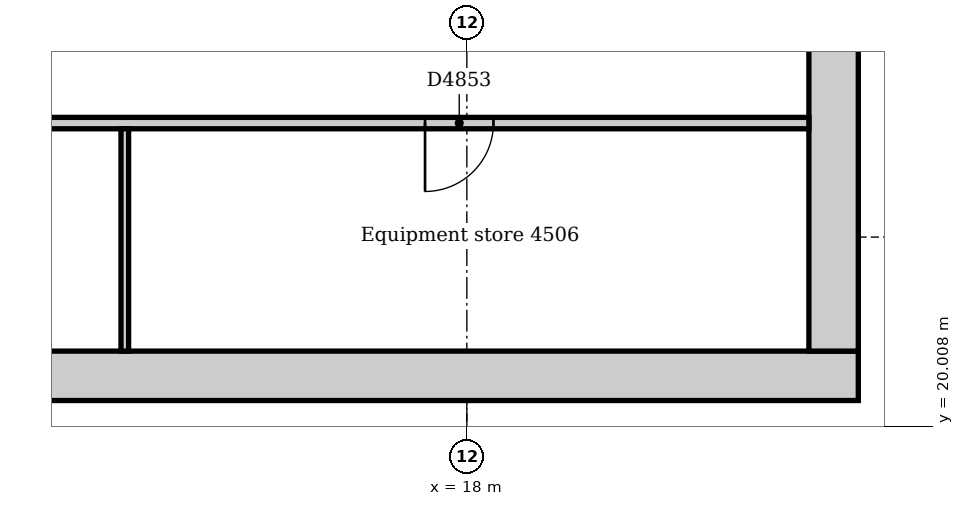
"""IFC4 building model, lengths in metres.
Left out: names, types, materials, properties, quantities, classifications, styles, units other than length and angle.
Written with IfcOpenShell. Run it as: python <this file> out.ifc"""

import sys

from ifc_helpers import new_model, si_unit, direction, frame, frame_2d, origin, place, context, subcontext, project, spatial, rectangle, extrude, element, fill, save


model = new_model("IFC4")
c1 = context("Model", 3, precision=1e-05, world=origin(), true_north=direction((0.0, 1.0)))
c2 = subcontext(c1, "Body", "Model", "MODEL_VIEW")
j1 = project(units=[si_unit("LENGTHUNIT", "METRE"), si_unit("PLANEANGLEUNIT", "RADIAN")], contexts=[c1])
p1 = place(None, origin())
s1 = spatial("IfcSite", under=j1, at=p1, CompositionType="ELEMENT")
p2 = place(p1, origin())
s2 = spatial("IfcBuilding", under=s1, at=p2, CompositionType="ELEMENT")
p3 = place(p2, frame((0.0, 0.0, 189.0)))
s3 = spatial("IfcBuildingStorey", under=s2, at=p3, CompositionType="ELEMENT", Elevation=189.0)
p4 = place(p3, frame((3.9, 20.675, 0.0), z_axis=(0.0, 0.0, 1.0), x_axis=(1.0, 0.0, 0.0)))
e1 = element("IfcWall", 1, at=p4, inside=s3, PredefinedType="SOLIDWALL", context=c2, shape_type="SweptSolid", body=[
    extrude(rectangle(XDim=19.25, YDim=0.65, at=frame_2d((9.625, 0.0))), origin(), (0.0, 0.0, 1.0), 4.0),
])
p5 = place(p3, frame((22.825, 21.0, 0.0), z_axis=(0.0, 0.0, 1.0), x_axis=(0.0, 1.0, 0.0)))
e2 = element("IfcWall", 2, at=p5, inside=s3, PredefinedType="SOLIDWALL", context=c2, shape_type="SweptSolid", body=[
    extrude(rectangle(XDim=10.5, YDim=0.65, at=frame_2d((5.25, 0.0))), origin(), (0.0, 0.0, 1.0), 4.0),
])
p6 = place(p5, frame((4.35, 0.0, 0.0)))
e3 = element("IfcOpeningElement", 3, at=p6, cuts=e2, PredefinedType="OPENING", context=c2, shape_type="SweptSolid", body=[
    extrude(rectangle(XDim=1.8, YDim=2.1, at=frame_2d((0.9, 1.05))), frame((0.0, 0.335, 0.0), z_axis=(0.0, -1.0, 0.0), x_axis=(1.0, 0.0, 0.0)), (0.0, 0.0, 1.0), 0.67),
])
p7 = place(p3, frame((4.5, 24.0, 0.0), z_axis=(0.0, 0.0, 1.0), x_axis=(1.0, 0.0, 0.0)))
e4 = element("IfcWall", 4, at=p7, inside=s3, PredefinedType="PARTITIONING", context=c2, shape_type="SweptSolid", body=[
    extrude(rectangle(XDim=18.0, YDim=0.15, at=frame_2d((9.0, 0.0))), origin(), (0.0, 0.0, 1.0), 3.7),
])
p8 = place(p7, frame((1.85, 0.0, 0.0)))
e5 = element("IfcOpeningElement", 5, at=p8, cuts=e4, PredefinedType="OPENING", context=c2, shape_type="SweptSolid", body=[
    extrude(rectangle(XDim=0.9, YDim=2.1, at=frame_2d((0.45, 1.05))), frame((0.0, 0.085, 0.0), z_axis=(0.0, -1.0, 0.0), x_axis=(1.0, 0.0, 0.0)), (0.0, 0.0, 1.0), 0.17),
])
p9 = place(p7, frame((6.3, 0.0, 0.0)))
e6 = element("IfcOpeningElement", 6, at=p9, cuts=e4, PredefinedType="OPENING", context=c2, shape_type="SweptSolid", body=[
    extrude(rectangle(XDim=0.9, YDim=2.1, at=frame_2d((0.45, 1.05))), frame((0.0, 0.085, 0.0), z_axis=(0.0, -1.0, 0.0), x_axis=(1.0, 0.0, 0.0)), (0.0, 0.0, 1.0), 0.17),
])
p10 = place(p7, frame((12.95, 0.0, 0.0)))
e7 = element("IfcOpeningElement", 7, at=p10, cuts=e4, PredefinedType="OPENING", context=c2, shape_type="SweptSolid", body=[
    extrude(rectangle(XDim=0.9, YDim=2.1, at=frame_2d((0.45, 1.05))), frame((0.0, 0.085, 0.0), z_axis=(0.0, -1.0, 0.0), x_axis=(1.0, 0.0, 0.0)), (0.0, 0.0, 1.0), 0.17),
])
p11 = place(p3, frame((13.5, 21.0, 0.0), z_axis=(0.0, 0.0, 1.0), x_axis=(0.0, 1.0, 0.0)))
e8 = element("IfcWall", 8, at=p11, inside=s3, PredefinedType="PARTITIONING", context=c2, shape_type="SweptSolid", body=[
    extrude(rectangle(XDim=2.925, YDim=0.1, at=frame_2d((1.462, 0.0))), origin(), (0.0, 0.0, 1.0), 3.7),
])
p12 = place(p10, frame((0.9, 0.0, 0.0), z_axis=(0.0, 0.0, 1.0), x_axis=(-1.0, 0.0, 0.0)))
e9 = element("IfcDoor", 9, at=p12, inside=s3, OperationType="SINGLE_SWING_RIGHT", PredefinedType="DOOR", context=c2, shape_type="SweptSolid", body=[
    extrude(rectangle(XDim=0.9, YDim=2.1, at=frame_2d((0.45, 1.05))), frame((0.0, 0.025, 0.0), z_axis=(0.0, -1.0, 0.0), x_axis=(1.0, 0.0, 0.0)), (0.0, 0.0, 1.0), 0.05),
])
fill(e7, e9)
save(model, sys.argv[1])
